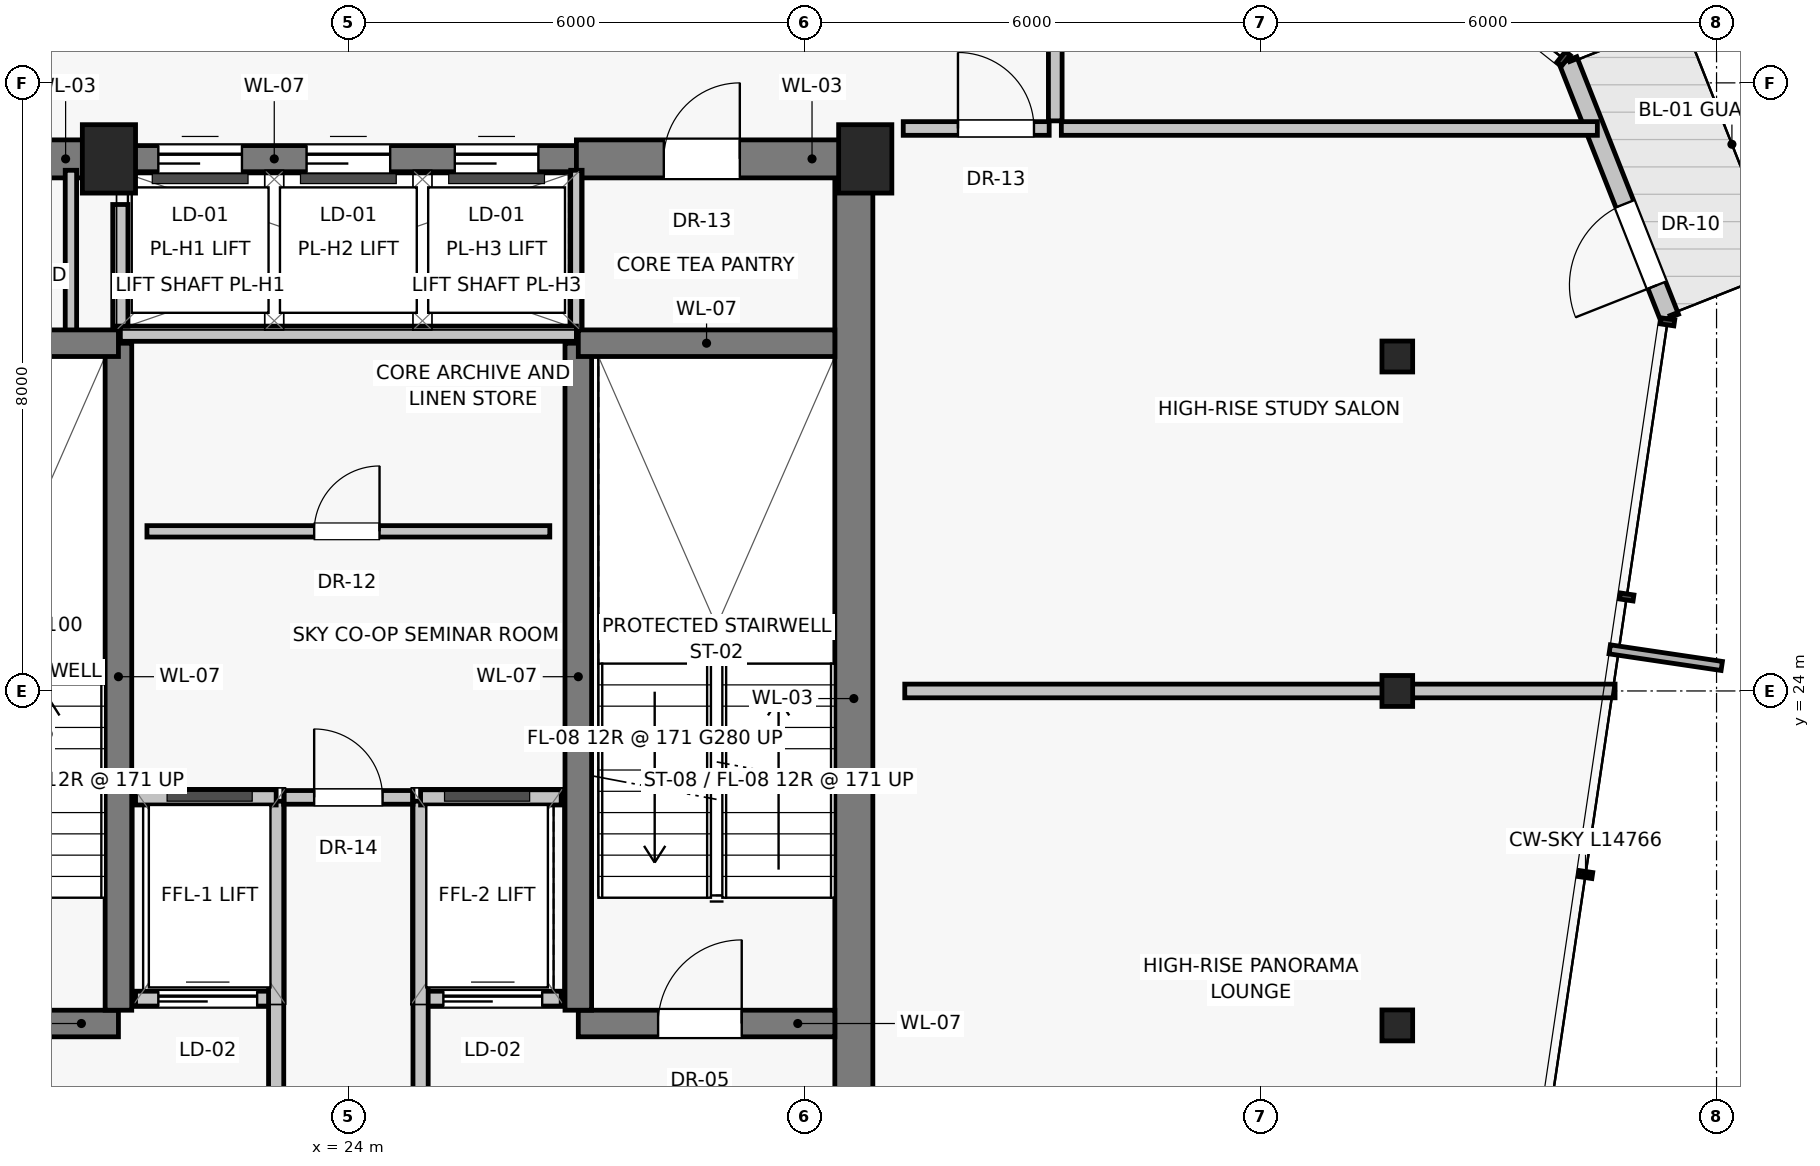
"""IFC4 building model, lengths in metres.
Left out: names, types, materials, properties, quantities, classifications, styles, units other than length and angle.
Written with IfcOpenShell. Run it as: python <this file> out.ifc"""

import sys

from ifc_helpers import new_model, si_unit, direction, frame, frame_2d, origin, origin_2d, place, context, subcontext, project, spatial, rectangle, i_section, extrude, source, transform, mapped, element, fill, save


model = new_model("IFC4")
c1 = context("Model", 3, precision=1e-05, world=origin(), true_north=direction((0.0, 1.0)))
c2 = subcontext(c1, "Body", "Model", "MODEL_VIEW")
j1 = project(units=[si_unit("LENGTHUNIT", "METRE"), si_unit("PLANEANGLEUNIT", "RADIAN")], contexts=[c1])
p1 = place(None, origin())
s1 = spatial("IfcSite", under=j1, at=p1, CompositionType="ELEMENT")
p2 = place(p1, origin())
s2 = spatial("IfcBuilding", under=s1, at=p2, CompositionType="ELEMENT")
p3 = place(p2, frame((0.0, 0.0, 236.55)))
s3 = spatial("IfcBuildingStorey", under=s2, at=p3, CompositionType="ELEMENT", Elevation=236.55)
for number, where, z_axis, x_axis in (
    (1, (20.85, 31.0, 0.0), (0.0, 0.0, 1.0), (1.0, 0.0, 0.0)),
    (2, (30.8, 31.0, 0.0), (0.0, 0.0, 1.0), (1.0, 0.0, 0.0)),
):
    element("IfcColumn", number, at=place(p3, frame(where, z_axis=z_axis, x_axis=x_axis)), inside=s3, PredefinedType="PILASTER", context=c2, shape_type="SweptSolid", body=[
        extrude(rectangle(XDim=0.7, YDim=0.9, at=origin_2d()), origin(), (0.0, 0.0, 1.0), 4.1),
    ])
for number, where, z_axis, x_axis in (
    (3, (37.8, 19.6, 0.0), (0.0, 0.0, 1.0), (1.0, 0.0, 0.0)),
    (4, (37.8, 24.0, 0.0), (0.0, 0.0, 1.0), (1.0, 0.0, 0.0)),
    (5, (37.8, 28.4, 0.0), (0.0, 0.0, 1.0), (1.0, 0.0, 0.0)),
):
    element("IfcColumn", number, at=place(p3, frame(where, z_axis=z_axis, x_axis=x_axis)), inside=s3, PredefinedType="COLUMN", context=c2, shape_type="SweptSolid", body=[
        extrude(i_section(OverallWidth=0.404, OverallDepth=0.407, WebThickness=0.025, FlangeThickness=0.04, at=origin_2d()), origin(), (0.0, 0.0, 1.0), 4.1),
    ])
p4 = place(p3, frame((41.383, 28.91, 0.0), z_axis=(0.0, 0.0, 1.0), x_axis=(-0.367458010502, 0.930040112317, 0.0)))
e6 = element("IfcWall", 6, at=p4, inside=s3, PredefinedType="SOLIDWALL", context=c2, shape_type="SweptSolid", body=[
    extrude(rectangle(XDim=3.642, YDim=0.25, at=frame_2d((1.821, 0.0))), origin(), (0.0, 0.0, 1.0), 3.865),
])
p5 = place(p4, frame((0.46, 0.0, 0.0)))
e7 = element("IfcOpeningElement", 7, at=p5, cuts=e6, PredefinedType="OPENING", context=c2, shape_type="SweptSolid", body=[
    extrude(rectangle(XDim=1.15, YDim=2.25, at=frame_2d((0.575, 1.125))), frame((0.0, 0.135, 0.0), z_axis=(0.0, -1.0, 0.0), x_axis=(1.0, 0.0, 0.0)), (0.0, 0.0, 1.0), 0.27),
])
p6 = place(p3, frame((30.65, 16.8, 0.0), z_axis=(0.0, 0.0, 1.0), x_axis=(0.0, 1.0, 0.0)))
e8 = element("IfcWall", 8, at=p6, inside=s3, PredefinedType="SHEAR", context=c2, shape_type="SweptSolid", body=[
    extrude(rectangle(XDim=14.2, YDim=0.5, at=frame_2d((7.1, 0.0))), origin(), (0.0, 0.0, 1.0), 3.865),
])
p7 = place(p3, frame((17.2, 31.0, 0.0), z_axis=(0.0, 0.0, 1.0), x_axis=(1.0, 0.0, 0.0)))
e9 = element("IfcWall", 9, at=p7, inside=s3, PredefinedType="SHEAR", context=c2, shape_type="SweptSolid", body=[
    extrude(rectangle(XDim=3.8, YDim=0.5, at=frame_2d((1.9, 0.0))), origin(), (0.0, 0.0, 1.0), 3.865),
])
p8 = place(p7, frame((1.25, 0.0, 0.0)))
e10 = element("IfcOpeningElement", 10, at=p8, cuts=e9, PredefinedType="OPENING", context=c2, shape_type="SweptSolid", body=[
    extrude(rectangle(XDim=0.86, YDim=2.01, at=frame_2d((0.43, 1.005))), frame((0.0, 0.26, 0.0), z_axis=(0.0, -1.0, 0.0), x_axis=(1.0, 0.0, 0.0)), (0.0, 0.0, 1.0), 0.52),
])
p9 = place(p3, frame((21.0, 31.0, 0.0), z_axis=(0.0, 0.0, 1.0), x_axis=(1.0, 0.0, 0.0)))
e11 = element("IfcWall", 11, at=p9, inside=s3, PredefinedType="SHEAR", context=c2, shape_type="SweptSolid", body=[
    extrude(rectangle(XDim=6.0, YDim=0.35, at=frame_2d((3.0, 0.0))), origin(), (0.0, 0.0, 1.0), 3.865),
])
p10 = place(p9, frame((0.5, 0.0, 0.0)))
e12 = element("IfcOpeningElement", 12, at=p10, cuts=e11, PredefinedType="OPENING", context=c2, shape_type="SweptSolid", body=[
    extrude(rectangle(XDim=1.1, YDim=2.08, at=frame_2d((0.55, 1.04))), frame((0.0, 0.185, 0.0), z_axis=(0.0, -1.0, 0.0), x_axis=(1.0, 0.0, 0.0)), (0.0, 0.0, 1.0), 0.37),
])
p11 = place(p9, frame((2.45, 0.0, 0.0)))
e13 = element("IfcOpeningElement", 13, at=p11, cuts=e11, PredefinedType="OPENING", context=c2, shape_type="SweptSolid", body=[
    extrude(rectangle(XDim=1.1, YDim=2.08, at=frame_2d((0.55, 1.04))), frame((0.0, 0.185, 0.0), z_axis=(0.0, -1.0, 0.0), x_axis=(1.0, 0.0, 0.0)), (0.0, 0.0, 1.0), 0.37),
])
p12 = place(p9, frame((4.4, 0.0, 0.0)))
e14 = element("IfcOpeningElement", 14, at=p12, cuts=e11, PredefinedType="OPENING", context=c2, shape_type="SweptSolid", body=[
    extrude(rectangle(XDim=1.1, YDim=2.08, at=frame_2d((0.55, 1.04))), frame((0.0, 0.185, 0.0), z_axis=(0.0, -1.0, 0.0), x_axis=(1.0, 0.0, 0.0)), (0.0, 0.0, 1.0), 0.37),
])
p13 = place(p3, frame((27.0, 31.0, 0.0), z_axis=(0.0, 0.0, 1.0), x_axis=(1.0, 0.0, 0.0)))
e15 = element("IfcWall", 15, at=p13, inside=s3, PredefinedType="SHEAR", context=c2, shape_type="SweptSolid", body=[
    extrude(rectangle(XDim=3.8, YDim=0.5, at=frame_2d((1.9, 0.0))), origin(), (0.0, 0.0, 1.0), 3.865),
])
p14 = place(p13, frame((1.15, 0.0, 0.0)))
e16 = element("IfcOpeningElement", 16, at=p14, cuts=e15, PredefinedType="OPENING", context=c2, shape_type="SweptSolid", body=[
    extrude(rectangle(XDim=1.0, YDim=2.01, at=frame_2d((0.5, 1.005))), frame((0.0, 0.26, 0.0), z_axis=(0.0, -1.0, 0.0), x_axis=(1.0, 0.0, 0.0)), (0.0, 0.0, 1.0), 0.52),
])
for number, where, z_axis, x_axis in (
    (17, (20.35, 28.65, 0.0), (0.0, 0.0, 1.0), (0.0, 1.0, 0.0)),
    (18, (27.0, 28.65, 0.0), (0.0, 0.0, 1.0), (0.0, 1.0, 0.0)),
):
    element("IfcWall", number, at=place(p3, frame(where, z_axis=z_axis, x_axis=x_axis)), inside=s3, PredefinedType="PARTITIONING", context=c2, shape_type="SweptSolid", body=[
        extrude(rectangle(XDim=2.2, YDim=0.15, at=frame_2d((1.1, 0.0))), origin(), (0.0, 0.0, 1.0), 3.865),
    ])
p15 = place(p3, frame((17.6, 19.625, 0.0), z_axis=(0.0, 0.0, 1.0), x_axis=(1.0, 0.0, 0.0)))
e19 = element("IfcWall", 19, at=p15, inside=s3, PredefinedType="SHEAR", context=c2, shape_type="SweptSolid", body=[
    extrude(rectangle(XDim=3.375, YDim=0.35, at=frame_2d((1.688, 0.0))), origin(), (0.0, 0.0, 1.0), 3.865),
])
p16 = place(p15, frame((1.05, 0.0, 0.0)))
e20 = element("IfcOpeningElement", 20, at=p16, cuts=e19, PredefinedType="OPENING", context=c2, shape_type="SweptSolid", body=[
    extrude(rectangle(XDim=1.1, YDim=2.03, at=frame_2d((0.55, 1.015))), frame((0.0, 0.185, 0.0), z_axis=(0.0, -1.0, 0.0), x_axis=(1.0, 0.0, 0.0)), (0.0, 0.0, 1.0), 0.37),
])
p17 = place(p3, frame((21.2, 19.95, 0.0), z_axis=(0.0, 0.0, 1.0), x_axis=(1.0, 0.0, 0.0)))
e21 = element("IfcWall", 21, at=p17, inside=s3, PredefinedType="SOLIDWALL", context=c2, shape_type="SweptSolid", body=[
    extrude(rectangle(XDim=1.85, YDim=0.2, at=frame_2d((0.925, 0.0))), origin(), (0.0, 0.0, 1.0), 3.865),
])
p18 = place(p17, frame((0.3, 0.0, 0.0)))
e22 = element("IfcOpeningElement", 22, at=p18, cuts=e21, PredefinedType="OPENING", context=c2, shape_type="SweptSolid", body=[
    extrude(rectangle(XDim=1.3, YDim=2.25, at=frame_2d((0.65, 1.125))), frame((0.0, 0.11, 0.0), z_axis=(0.0, -1.0, 0.0), x_axis=(1.0, 0.0, 0.0)), (0.0, 0.0, 1.0), 0.22),
])
p19 = place(p3, frame((24.95, 19.95, 0.0), z_axis=(0.0, 0.0, 1.0), x_axis=(1.0, 0.0, 0.0)))
e23 = element("IfcWall", 23, at=p19, inside=s3, PredefinedType="SOLIDWALL", context=c2, shape_type="SweptSolid", body=[
    extrude(rectangle(XDim=1.85, YDim=0.2, at=frame_2d((0.925, 0.0))), origin(), (0.0, 0.0, 1.0), 3.865),
])
p20 = place(p19, frame((0.3, 0.0, 0.0)))
e24 = element("IfcOpeningElement", 24, at=p20, cuts=e23, PredefinedType="OPENING", context=c2, shape_type="SweptSolid", body=[
    extrude(rectangle(XDim=1.3, YDim=2.25, at=frame_2d((0.65, 1.125))), frame((0.0, 0.11, 0.0), z_axis=(0.0, -1.0, 0.0), x_axis=(1.0, 0.0, 0.0)), (0.0, 0.0, 1.0), 0.22),
])
p21 = place(p3, frame((27.025, 19.625, 0.0), z_axis=(0.0, 0.0, 1.0), x_axis=(1.0, 0.0, 0.0)))
e25 = element("IfcWall", 25, at=p21, inside=s3, PredefinedType="SHEAR", context=c2, shape_type="SweptSolid", body=[
    extrude(rectangle(XDim=3.375, YDim=0.35, at=frame_2d((1.688, 0.0))), origin(), (0.0, 0.0, 1.0), 3.865),
])
p22 = place(p21, frame((1.05, 0.0, 0.0)))
e26 = element("IfcOpeningElement", 26, at=p22, cuts=e25, PredefinedType="OPENING", context=c2, shape_type="SweptSolid", body=[
    extrude(rectangle(XDim=1.1, YDim=2.03, at=frame_2d((0.55, 1.015))), frame((0.0, 0.185, 0.0), z_axis=(0.0, -1.0, 0.0), x_axis=(1.0, 0.0, 0.0)), (0.0, 0.0, 1.0), 0.37),
])
for number, where, z_axis, x_axis in (
    (27, (20.975, 19.8, 0.0), (0.0, 0.0, 1.0), (0.0, 1.0, 0.0)),
    (28, (27.025, 19.8, 0.0), (0.0, 0.0, 1.0), (0.0, 1.0, 0.0)),
):
    element("IfcWall", number, at=place(p3, frame(where, z_axis=z_axis, x_axis=x_axis)), inside=s3, PredefinedType="SHEAR", context=c2, shape_type="SweptSolid", body=[
        extrude(rectangle(XDim=8.775, YDim=0.35, at=frame_2d((4.387, 0.0))), origin(), (0.0, 0.0, 1.0), 3.865),
    ])
for number, where, z_axis, x_axis in (
    (29, (17.6, 28.575, 0.0), (0.0, 0.0, 1.0), (1.0, 0.0, 0.0)),
    (30, (27.025, 28.575, 0.0), (0.0, 0.0, 1.0), (1.0, 0.0, 0.0)),
):
    element("IfcWall", number, at=place(p3, frame(where, z_axis=z_axis, x_axis=x_axis)), inside=s3, PredefinedType="SHEAR", context=c2, shape_type="SweptSolid", body=[
        extrude(rectangle(XDim=3.375, YDim=0.35, at=frame_2d((1.688, 0.0))), origin(), (0.0, 0.0, 1.0), 3.865),
    ])
for number, where, z_axis, x_axis in (
    (31, (23.05, 16.95, 0.0), (0.0, 0.0, 1.0), (0.0, 1.0, 0.0)),
    (32, (24.95, 16.95, 0.0), (0.0, 0.0, 1.0), (0.0, 1.0, 0.0)),
):
    element("IfcWall", number, at=place(p3, frame(where, z_axis=z_axis, x_axis=x_axis)), inside=s3, PredefinedType="SOLIDWALL", context=c2, shape_type="SweptSolid", body=[
        extrude(rectangle(XDim=5.6, YDim=0.2, at=frame_2d((2.8, 0.0))), origin(), (0.0, 0.0, 1.0), 3.865),
    ])
for number, where, z_axis, x_axis in (
    (33, (21.2, 22.6, 0.0), (0.0, 0.0, 1.0), (1.0, 0.0, 0.0)),
    (34, (24.95, 22.6, 0.0), (0.0, 0.0, 1.0), (1.0, 0.0, 0.0)),
):
    element("IfcWall", number, at=place(p3, frame(where, z_axis=z_axis, x_axis=x_axis)), inside=s3, PredefinedType="SOLIDWALL", context=c2, shape_type="SweptSolid", body=[
        extrude(rectangle(XDim=1.85, YDim=0.2, at=frame_2d((0.925, 0.0))), origin(), (0.0, 0.0, 1.0), 3.865),
    ])
p23 = place(p3, frame((21.0, 28.7, 0.0), z_axis=(0.0, 0.0, 1.0), x_axis=(1.0, 0.0, 0.0)))
e35 = element("IfcWall", 35, at=p23, inside=s3, PredefinedType="SOLIDWALL", context=c2, shape_type="SweptSolid", body=[
    extrude(rectangle(XDim=6.0, YDim=0.2, at=frame_2d((3.0, 0.0))), origin(), (0.0, 0.0, 1.0), 3.865),
])
p24 = place(p3, frame((21.0, 28.8, 0.0), z_axis=(0.0, 0.0, 1.0), x_axis=(0.0, 1.0, 0.0)))
e36 = element("IfcWall", 36, at=p24, inside=s3, PredefinedType="SOLIDWALL", context=c2, shape_type="SweptSolid", body=[
    extrude(rectangle(XDim=1.6, YDim=0.2, at=frame_2d((0.8, 0.0))), origin(), (0.0, 0.0, 1.0), 3.865),
])
p25 = place(p3, frame((23.15, 22.6, 0.0), z_axis=(0.0, 0.0, 1.0), x_axis=(1.0, 0.0, 0.0)))
e37 = element("IfcWall", 37, at=p25, inside=s3, PredefinedType="PARTITIONING", context=c2, shape_type="SweptSolid", body=[
    extrude(rectangle(XDim=1.7, YDim=0.18, at=frame_2d((0.85, 0.0))), origin(), (0.0, 0.0, 1.0), 3.865),
])
p26 = place(p25, frame((0.4, 0.0, 0.0)))
e38 = element("IfcOpeningElement", 38, at=p26, cuts=e37, PredefinedType="OPENING", context=c2, shape_type="SweptSolid", body=[
    extrude(rectangle(XDim=0.9, YDim=2.01, at=frame_2d((0.45, 1.005))), frame((0.0, 0.1, 0.0), z_axis=(0.0, -1.0, 0.0), x_axis=(1.0, 0.0, 0.0)), (0.0, 0.0, 1.0), 0.2),
])
p27 = place(p3, frame((21.35, 26.1, 0.0), z_axis=(0.0, 0.0, 1.0), x_axis=(1.0, 0.0, 0.0)))
e39 = element("IfcWall", 39, at=p27, inside=s3, PredefinedType="PARTITIONING", context=c2, shape_type="SweptSolid", body=[
    extrude(rectangle(XDim=5.3, YDim=0.15, at=frame_2d((2.65, 0.0))), origin(), (0.0, 0.0, 1.0), 3.865),
])
p28 = place(p27, frame((2.2, 0.0, 0.0)))
e40 = element("IfcOpeningElement", 40, at=p28, cuts=e39, PredefinedType="OPENING", context=c2, shape_type="SweptSolid", body=[
    extrude(rectangle(XDim=0.86, YDim=2.01, at=frame_2d((0.43, 1.005))), frame((0.0, 0.085, 0.0), z_axis=(0.0, -1.0, 0.0), x_axis=(1.0, 0.0, 0.0)), (0.0, 0.0, 1.0), 0.17),
])
p29 = place(p3, frame((31.32, 24.0, 0.0), z_axis=(0.0, 0.0, 1.0), x_axis=(1.0, 0.0, 0.0)))
e41 = element("IfcWall", 41, at=p29, inside=s3, PredefinedType="PARTITIONING", context=c2, shape_type="SweptSolid", body=[
    extrude(rectangle(XDim=9.345, YDim=0.18, at=frame_2d((4.672, 0.0))), origin(), (0.0, 0.0, 1.0), 3.865),
])
p30 = place(p3, frame((33.3, 31.5, 0.0), z_axis=(0.0, 0.0, 1.0), x_axis=(0.0, 1.0, 0.0)))
e42 = element("IfcWall", 42, at=p30, inside=s3, PredefinedType="PARTITIONING", context=c2, shape_type="SweptSolid", body=[
    extrude(rectangle(XDim=1.9, YDim=0.18, at=frame_2d((0.95, 0.0))), origin(), (0.0, 0.0, 1.0), 3.865),
])
p31 = place(p3, frame((31.3, 31.4, 0.0), z_axis=(0.0, 0.0, 1.0), x_axis=(1.0, 0.0, 0.0)))
e43 = element("IfcWall", 43, at=p31, inside=s3, PredefinedType="PARTITIONING", context=c2, shape_type="SweptSolid", body=[
    extrude(rectangle(XDim=1.92, YDim=0.18, at=frame_2d((0.96, 0.0))), origin(), (0.0, 0.0, 1.0), 3.865),
])
p32 = place(p31, frame((0.72, 0.0, 0.0)))
e44 = element("IfcOpeningElement", 44, at=p32, cuts=e43, PredefinedType="OPENING", context=c2, shape_type="SweptSolid", body=[
    extrude(rectangle(XDim=1.0, YDim=2.01, at=frame_2d((0.5, 1.005))), frame((0.0, 0.1, 0.0), z_axis=(0.0, -1.0, 0.0), x_axis=(1.0, 0.0, 0.0)), (0.0, 0.0, 1.0), 0.2),
])
p33 = place(p3, frame((33.38, 31.4, 0.0), z_axis=(0.0, 0.0, 1.0), x_axis=(1.0, 0.0, 0.0)))
e45 = element("IfcWall", 45, at=p33, inside=s3, PredefinedType="PARTITIONING", context=c2, shape_type="SweptSolid", body=[
    extrude(rectangle(XDim=7.052, YDim=0.18, at=frame_2d((3.526, 0.0))), origin(), (0.0, 0.0, 1.0), 3.865),
])
m1 = source(origin(), c2, "Body", "SweptSolid", [
    extrude(rectangle(XDim=1.15, YDim=2.25, at=frame_2d((0.575, 1.125))), frame((0.0, 0.025, 0.0), z_axis=(0.0, -1.0, 0.0), x_axis=(1.0, 0.0, 0.0)), (0.0, 0.0, 1.0), 0.05),
])
p34 = place(p5, frame((1.15, 0.0, 0.0), z_axis=(0.0, 0.0, 1.0), x_axis=(-1.0, 0.0, 0.0)))
e46 = element("IfcDoor", 46, at=p34, inside=s3, OperationType="SINGLE_SWING_LEFT", PredefinedType="DOOR", context=c2, shape_type="MappedRepresentation", body=[
    mapped(m1, transform((0.0, 0.0, 0.0), scale=1.0)),
])
fill(e7, e46)
m2 = source(origin(), c2, "Body", "SweptSolid", [
    extrude(rectangle(XDim=1.1, YDim=2.08, at=frame_2d((0.55, 1.04))), frame((0.0, 0.025, 0.0), z_axis=(0.0, -1.0, 0.0), x_axis=(1.0, 0.0, 0.0)), (0.0, 0.0, 1.0), 0.05),
])
p35 = place(p10, origin())
e47 = element("IfcDoor", 47, at=p35, inside=s3, OperationType="SLIDING_TO_LEFT", PredefinedType="DOOR", context=c2, shape_type="MappedRepresentation", body=[
    mapped(m2, transform((0.0, 0.0, 0.0), scale=1.0)),
])
fill(e12, e47)
p36 = place(p11, origin())
e48 = element("IfcDoor", 48, at=p36, inside=s3, OperationType="SLIDING_TO_LEFT", PredefinedType="DOOR", context=c2, shape_type="MappedRepresentation", body=[
    mapped(m2, transform((0.0, 0.0, 0.0), scale=1.0)),
])
fill(e13, e48)
p37 = place(p12, origin())
e49 = element("IfcDoor", 49, at=p37, inside=s3, OperationType="SLIDING_TO_LEFT", PredefinedType="DOOR", context=c2, shape_type="MappedRepresentation", body=[
    mapped(m2, transform((0.0, 0.0, 0.0), scale=1.0)),
])
fill(e14, e49)
m3 = source(origin(), c2, "Body", "SweptSolid", [
    extrude(rectangle(XDim=1.0, YDim=2.01, at=frame_2d((0.5, 1.005))), frame((0.0, 0.025, 0.0), z_axis=(0.0, -1.0, 0.0), x_axis=(1.0, 0.0, 0.0)), (0.0, 0.0, 1.0), 0.05),
])
p38 = place(p14, origin())
e50 = element("IfcDoor", 50, at=p38, inside=s3, OperationType="SINGLE_SWING_RIGHT", PredefinedType="DOOR", context=c2, shape_type="MappedRepresentation", body=[
    mapped(m3, transform((0.0, 0.0, 0.0), scale=1.0)),
])
fill(e16, e50)
m4 = source(origin(), c2, "Body", "SweptSolid", [
    extrude(rectangle(XDim=1.3, YDim=2.25, at=frame_2d((0.65, 1.125))), frame((0.0, 0.025, 0.0), z_axis=(0.0, -1.0, 0.0), x_axis=(1.0, 0.0, 0.0)), (0.0, 0.0, 1.0), 0.05),
])
p39 = place(p18, origin())
e51 = element("IfcDoor", 51, at=p39, inside=s3, OperationType="SLIDING_TO_LEFT", PredefinedType="DOOR", context=c2, shape_type="MappedRepresentation", body=[
    mapped(m4, transform((0.0, 0.0, 0.0), scale=1.0)),
])
fill(e22, e51)
p40 = place(p20, origin())
e52 = element("IfcDoor", 52, at=p40, inside=s3, OperationType="SLIDING_TO_LEFT", PredefinedType="DOOR", context=c2, shape_type="MappedRepresentation", body=[
    mapped(m4, transform((0.0, 0.0, 0.0), scale=1.0)),
])
fill(e24, e52)
m5 = source(origin(), c2, "Body", "SweptSolid", [
    extrude(rectangle(XDim=1.1, YDim=2.03, at=frame_2d((0.55, 1.015))), frame((0.0, 0.025, 0.0), z_axis=(0.0, -1.0, 0.0), x_axis=(1.0, 0.0, 0.0)), (0.0, 0.0, 1.0), 0.05),
])
p41 = place(p22, origin())
e53 = element("IfcDoor", 53, at=p41, inside=s3, OperationType="SINGLE_SWING_RIGHT", PredefinedType="DOOR", context=c2, shape_type="MappedRepresentation", body=[
    mapped(m5, transform((0.0, 0.0, 0.0), scale=1.0)),
])
fill(e26, e53)
m6 = source(origin(), c2, "Body", "SweptSolid", [
    extrude(rectangle(XDim=0.9, YDim=2.01, at=frame_2d((0.45, 1.005))), frame((0.0, 0.025, 0.0), z_axis=(0.0, -1.0, 0.0), x_axis=(1.0, 0.0, 0.0)), (0.0, 0.0, 1.0), 0.05),
])
p42 = place(p26, origin())
e54 = element("IfcDoor", 54, at=p42, inside=s3, OperationType="SINGLE_SWING_LEFT", PredefinedType="DOOR", context=c2, shape_type="MappedRepresentation", body=[
    mapped(m6, transform((0.0, 0.0, 0.0), scale=1.0)),
])
fill(e38, e54)
m7 = source(origin(), c2, "Body", "SweptSolid", [
    extrude(rectangle(XDim=0.86, YDim=2.01, at=frame_2d((0.43, 1.005))), frame((0.0, 0.025, 0.0), z_axis=(0.0, -1.0, 0.0), x_axis=(1.0, 0.0, 0.0)), (0.0, 0.0, 1.0), 0.05),
])
p43 = place(p28, origin())
e55 = element("IfcDoor", 55, at=p43, inside=s3, OperationType="SINGLE_SWING_RIGHT", PredefinedType="DOOR", context=c2, shape_type="MappedRepresentation", body=[
    mapped(m7, transform((0.0, 0.0, 0.0), scale=1.0)),
])
fill(e40, e55)
p44 = place(p32, origin())
e56 = element("IfcDoor", 56, at=p44, inside=s3, OperationType="SINGLE_SWING_LEFT", PredefinedType="DOOR", context=c2, shape_type="MappedRepresentation", body=[
    mapped(m3, transform((0.0, 0.0, 0.0), scale=1.0)),
])
fill(e44, e56)
save(model, sys.argv[1])
